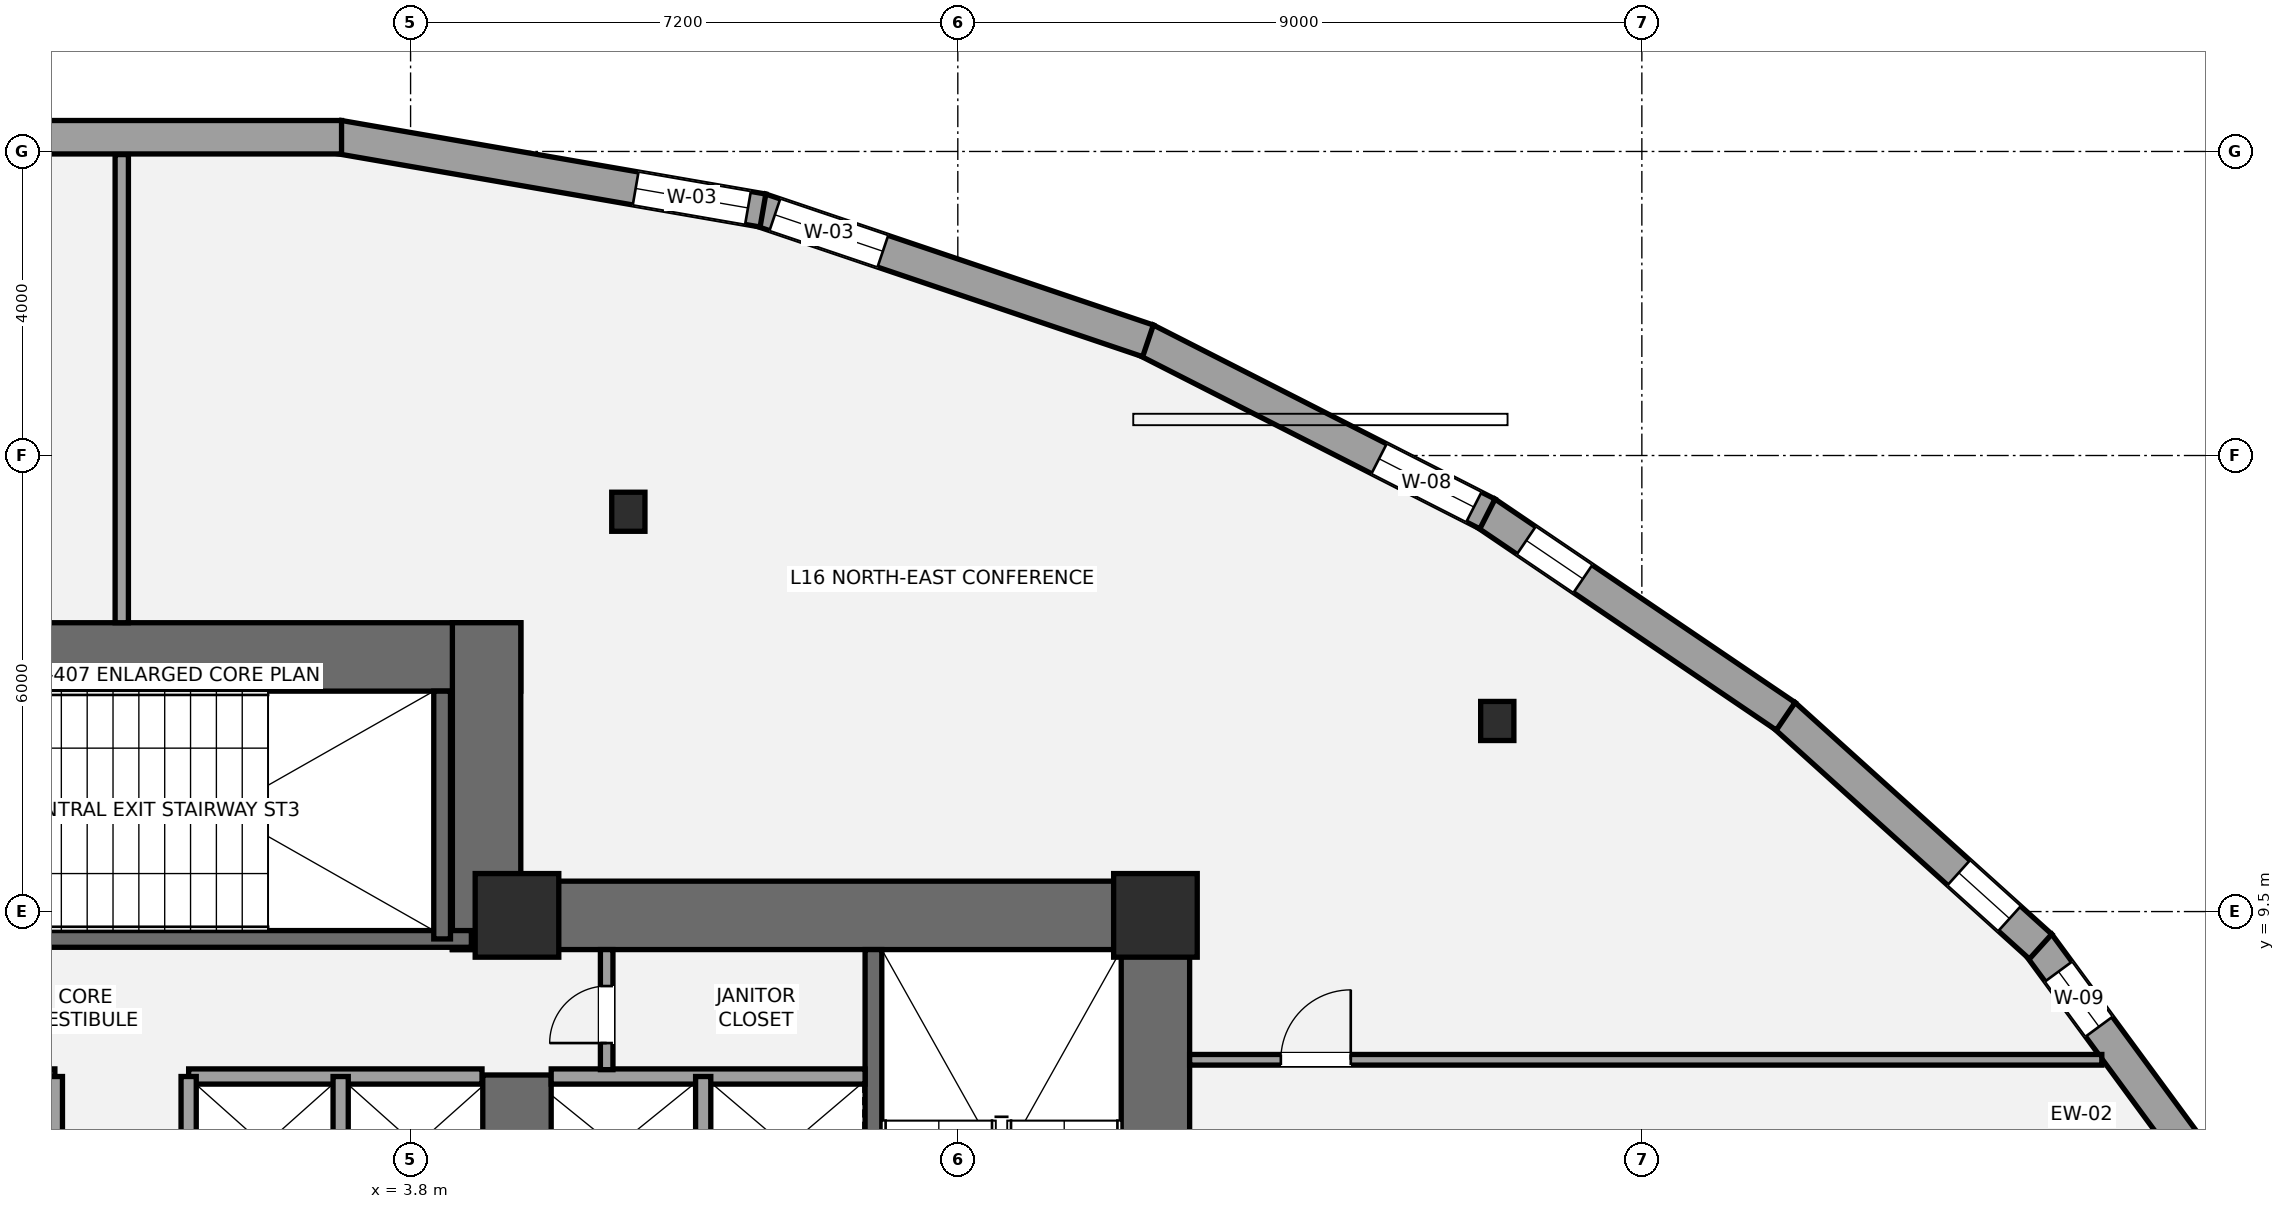
"""IFC4 building model, lengths in metres.
Left out: names, types, materials, properties, quantities, classifications, styles, units other than length and angle.
Written with IfcOpenShell. Run it as: python <this file> out.ifc"""

import sys

from ifc_helpers import new_model, si_unit, direction, frame, frame_2d, origin, origin_2d, place, context, subcontext, project, spatial, rectangle, i_section, extrude, element, fill, save


model = new_model("IFC4")
c1 = context("Model", 3, precision=1e-05, world=origin(), true_north=direction((0.0, 1.0)))
c2 = subcontext(c1, "Body", "Model", "MODEL_VIEW")
j1 = project(units=[si_unit("LENGTHUNIT", "METRE"), si_unit("PLANEANGLEUNIT", "RADIAN")], contexts=[c1])
p1 = place(None, origin())
s1 = spatial("IfcSite", under=j1, at=p1, CompositionType="ELEMENT")
p2 = place(p1, origin())
s2 = spatial("IfcBuilding", under=s1, at=p2, CompositionType="ELEMENT")
p3 = place(p2, frame((0.0, 0.0, 63.0)))
s3 = spatial("IfcBuildingStorey", under=s2, at=p3, CompositionType="ELEMENT", Elevation=63.0)
p4 = place(p3, frame((13.6, 0.95, 0.0), z_axis=(0.0, 0.0, 1.0), x_axis=(0.0, 1.0, 0.0)))
e1 = element("IfcWall", 1, at=p4, inside=s3, PredefinedType="SHEAR", context=c2, shape_type="SweptSolid", body=[
    extrude(rectangle(XDim=8.95, YDim=0.9, at=frame_2d((4.475, 0.0))), origin(), (0.0, 0.0, 1.0), 3.6),
])
p5 = place(p3, frame((4.35, 9.45, 0.0), z_axis=(0.0, 0.0, 1.0), x_axis=(1.0, 0.0, 0.0)))
e2 = element("IfcWall", 2, at=p5, inside=s3, PredefinedType="SHEAR", context=c2, shape_type="SweptSolid", body=[
    extrude(rectangle(XDim=9.7, YDim=0.9, at=frame_2d((4.85, 0.0))), origin(), (0.0, 0.0, 1.0), 3.6),
])
p6 = place(p3, frame((5.2, 5.35, 0.0), z_axis=(0.0, 0.0, 1.0), x_axis=(0.0, 1.0, 0.0)))
e3 = element("IfcWall", 3, at=p6, inside=s3, PredefinedType="SHEAR", context=c2, shape_type="SweptSolid", body=[
    extrude(rectangle(XDim=2.0, YDim=0.9, at=frame_2d((1.0, 0.0))), origin(), (0.0, 0.0, 1.0), 3.6),
])
p7 = place(p3, frame((9.89, 1.85, 0.0), z_axis=(0.0, 0.0, 1.0), x_axis=(0.0, 1.0, 0.0)))
e4 = element("IfcWall", 4, at=p7, inside=s3, PredefinedType="SHEAR", context=c2, shape_type="SweptSolid", body=[
    extrude(rectangle(XDim=7.15, YDim=0.22, at=frame_2d((3.575, 0.0))), origin(), (0.0, 0.0, 1.0), 3.6),
])
p8 = place(p3, frame((-5.25, 12.85, 0.0), z_axis=(0.0, 0.0, 1.0), x_axis=(1.0, 0.0, 0.0)))
e5 = element("IfcWall", 5, at=p8, inside=s3, PredefinedType="SHEAR", context=c2, shape_type="SweptSolid", body=[
    extrude(rectangle(XDim=10.5, YDim=0.9, at=frame_2d((5.25, 0.0))), origin(), (0.0, 0.0, 1.0), 3.6),
])
p9 = place(p3, frame((4.8, 9.0, 0.0), z_axis=(0.0, 0.0, 1.0), x_axis=(0.0, 1.0, 0.0)))
e6 = element("IfcWall", 6, at=p9, inside=s3, PredefinedType="SHEAR", context=c2, shape_type="SweptSolid", body=[
    extrude(rectangle(XDim=4.3, YDim=0.9, at=frame_2d((2.15, 0.0))), origin(), (0.0, 0.0, 1.0), 3.6),
])
p10 = place(p3, frame((-4.7, 9.14, 0.0), z_axis=(0.0, 0.0, 1.0), x_axis=(1.0, 0.0, 0.0)))
e7 = element("IfcWall", 7, at=p10, inside=s3, PredefinedType="SHEAR", context=c2, shape_type="SweptSolid", body=[
    extrude(rectangle(XDim=9.3, YDim=0.22, at=frame_2d((4.65, 0.0))), origin(), (0.0, 0.0, 1.0), 3.6),
])
p11 = place(p10, frame((1.15, 0.0, 0.0)))
e8 = element("IfcOpeningElement", 8, at=p11, cuts=e7, PredefinedType="OPENING", context=c2, shape_type="SweptSolid", body=[
    extrude(rectangle(XDim=1.05, YDim=2.15, at=frame_2d((0.525, 1.075))), frame((0.0, 0.12, 0.0), z_axis=(0.0, -1.0, 0.0), x_axis=(1.0, 0.0, 0.0)), (0.0, 0.0, 1.0), 0.24),
])
p12 = place(p3, frame((4.215, 9.14, 0.0), z_axis=(0.0, 0.0, 1.0), x_axis=(0.0, 1.0, 0.0)))
e9 = element("IfcWall", 9, at=p12, inside=s3, PredefinedType="SHEAR", context=c2, shape_type="SweptSolid", body=[
    extrude(rectangle(XDim=3.26, YDim=0.22, at=frame_2d((1.63, 0.0))), origin(), (0.0, 0.0, 1.0), 3.6),
])
for number, where, z_axis, x_axis in (
    (10, (5.2, 9.45, 0.0), (0.0, 0.0, 1.0), (1.0, 0.0, 0.0)),
    (11, (13.6, 9.45, 0.0), (0.0, 0.0, 1.0), (1.0, 0.0, 0.0)),
):
    element("IfcColumn", number, at=place(p3, frame(where, z_axis=z_axis, x_axis=x_axis)), inside=s3, PredefinedType="COLUMN", context=c2, shape_type="SweptSolid", body=[
        extrude(rectangle(XDim=1.1, YDim=1.1, at=origin_2d()), origin(), (0.0, 0.0, 1.0), 3.6),
    ])
for number, where, z_axis, x_axis in (
    (12, (18.098, 12.007, 0.0), (0.0, 0.0, 1.0), (1.0, 0.0, 0.0)),
    (13, (6.665, 14.76, 0.0), (0.0, 0.0, 1.0), (1.0, 0.0, 0.0)),
):
    element("IfcColumn", number, at=place(p3, frame(where, z_axis=z_axis, x_axis=x_axis)), inside=s3, PredefinedType="COLUMN", context=c2, shape_type="SweptSolid", body=[
        extrude(i_section(OverallWidth=0.437, OverallDepth=0.514, WebThickness=0.061, FlangeThickness=0.097, at=origin_2d()), origin(), (0.0, 0.0, 1.0), 3.6),
    ])
p13 = place(p3, frame((25.216, 9.072, 0.0), z_axis=(0.0, 0.0, 1.0), x_axis=(0.592261182237, -0.80574604685, 0.0)))
e14 = element("IfcWall", 14, at=p13, inside=s3, PredefinedType="STANDARD", context=c2, shape_type="SweptSolid", body=[
    extrude(rectangle(XDim=4.291, YDim=0.44, at=frame_2d((2.146, 0.0))), origin(), (0.0, 0.0, 1.0), 2.529),
])
p14 = place(p13, frame((0.449, 0.0, 0.58)))
e15 = element("IfcOpeningElement", 15, at=p14, cuts=e14, PredefinedType="OPENING", context=c2, shape_type="SweptSolid", body=[
    extrude(rectangle(XDim=0.9, YDim=1.35, at=frame_2d((0.45, 0.675))), frame((0.0, 0.23, 0.0), z_axis=(0.0, -1.0, 0.0), x_axis=(1.0, 0.0, 0.0)), (0.0, 0.0, 1.0), 0.46),
])
p15 = place(p3, frame((21.869, 12.087, 0.0), z_axis=(0.0, 0.0, 1.0), x_axis=(0.742354052059, -0.670007806963, 0.0)))
e16 = element("IfcWall", 16, at=p15, inside=s3, PredefinedType="STANDARD", context=c2, shape_type="SweptSolid", body=[
    extrude(rectangle(XDim=4.549, YDim=0.44, at=frame_2d((2.274, 0.0))), origin(), (0.0, 0.0, 1.0), 2.529),
])
p16 = place(p15, frame((3.099, 0.0, 0.58)))
e17 = element("IfcOpeningElement", 17, at=p16, cuts=e16, PredefinedType="OPENING", context=c2, shape_type="SweptSolid", body=[
    extrude(rectangle(XDim=0.9, YDim=1.35, at=frame_2d((0.45, 0.675))), frame((0.0, 0.23, 0.0), z_axis=(0.0, -1.0, 0.0), x_axis=(1.0, 0.0, 0.0)), (0.0, 0.0, 1.0), 0.46),
])
p17 = place(p3, frame((17.945, 14.745, 0.0), z_axis=(0.0, 0.0, 1.0), x_axis=(0.827693991977, -0.561179699959, 0.0)))
e18 = element("IfcWall", 18, at=p17, inside=s3, PredefinedType="STANDARD", context=c2, shape_type="SweptSolid", body=[
    extrude(rectangle(XDim=4.77, YDim=0.44, at=frame_2d((2.385, 0.0))), origin(), (0.0, 0.0, 1.0), 2.529),
])
p18 = place(p17, frame((0.646, 0.0, 0.58)))
e19 = element("IfcOpeningElement", 19, at=p18, cuts=e18, PredefinedType="OPENING", context=c2, shape_type="SweptSolid", body=[
    extrude(rectangle(XDim=0.9, YDim=1.35, at=frame_2d((0.45, 0.675))), frame((0.0, 0.23, 0.0), z_axis=(0.0, -1.0, 0.0), x_axis=(1.0, 0.0, 0.0)), (0.0, 0.0, 1.0), 0.46),
])
p19 = place(p3, frame((13.473, 17.021, 0.0), z_axis=(0.0, 0.0, 1.0), x_axis=(0.891072734441, -0.45386053137, 0.0)))
e20 = element("IfcWall", 20, at=p19, inside=s3, PredefinedType="STANDARD", context=c2, shape_type="SweptSolid", body=[
    extrude(rectangle(XDim=5.045, YDim=0.44, at=frame_2d((2.522, 0.0))), origin(), (0.0, 0.0, 1.0), 2.529),
])
p20 = place(p19, frame((3.445, 0.0, 0.58)))
e21 = element("IfcOpeningElement", 21, at=p20, cuts=e20, PredefinedType="OPENING", context=c2, shape_type="SweptSolid", body=[
    extrude(rectangle(XDim=1.4, YDim=1.55, at=frame_2d((0.7, 0.775))), frame((0.0, 0.23, 0.0), z_axis=(0.0, -1.0, 0.0), x_axis=(1.0, 0.0, 0.0)), (0.0, 0.0, 1.0), 0.46),
])
p21 = place(p3, frame((8.403, 18.731, 0.0), z_axis=(0.0, 0.0, 1.0), x_axis=(0.947368862969, -0.320144088616, 0.0)))
e22 = element("IfcWall", 22, at=p21, inside=s3, PredefinedType="STANDARD", context=c2, shape_type="SweptSolid", body=[
    extrude(rectangle(XDim=5.382, YDim=0.44, at=frame_2d((2.691, 0.0))), origin(), (0.0, 0.0, 1.0), 2.529),
])
p22 = place(p21, frame((0.2, 0.0, 0.48)))
e23 = element("IfcOpeningElement", 23, at=p22, cuts=e22, PredefinedType="OPENING", context=c2, shape_type="SweptSolid", body=[
    extrude(rectangle(XDim=1.5, YDim=1.7, at=frame_2d((0.75, 0.85))), frame((0.0, 0.23, 0.0), z_axis=(0.0, -1.0, 0.0), x_axis=(1.0, 0.0, 0.0)), (0.0, 0.0, 1.0), 0.46),
])
p23 = place(p3, frame((2.854, 19.69, 0.0), z_axis=(0.0, 0.0, 1.0), x_axis=(0.985308697227, -0.170782818716, 0.0)))
e24 = element("IfcWall", 24, at=p23, inside=s3, PredefinedType="STANDARD", context=c2, shape_type="SweptSolid", body=[
    extrude(rectangle(XDim=5.665, YDim=0.44, at=frame_2d((2.833, 0.0))), origin(), (0.0, 0.0, 1.0), 2.529),
])
p24 = place(p23, frame((3.965, 0.0, 0.65)))
e25 = element("IfcOpeningElement", 25, at=p24, cuts=e24, PredefinedType="OPENING", context=c2, shape_type="SweptSolid", body=[
    extrude(rectangle(XDim=1.5, YDim=1.7, at=frame_2d((0.75, 0.85))), frame((0.0, 0.23, 0.0), z_axis=(0.0, -1.0, 0.0), x_axis=(1.0, 0.0, 0.0)), (0.0, 0.0, 1.0), 0.46),
])
p25 = place(p3, frame((-2.892, 19.687, 0.0), z_axis=(0.0, 0.0, 1.0), x_axis=(1.0, 0.0, 0.0)))
e26 = element("IfcWall", 26, at=p25, inside=s3, PredefinedType="STANDARD", context=c2, shape_type="SweptSolid", body=[
    extrude(rectangle(XDim=5.784, YDim=0.44, at=frame_2d((2.892, 0.0))), origin(), (0.0, 0.0, 1.0), 2.529),
])
p26 = place(p25, frame((0.25, 0.0, 0.65)))
e27 = element("IfcOpeningElement", 27, at=p26, cuts=e26, PredefinedType="OPENING", context=c2, shape_type="SweptSolid", body=[
    extrude(rectangle(XDim=1.5, YDim=1.7, at=frame_2d((0.75, 0.85))), frame((0.0, 0.23, 0.0), z_axis=(0.0, -1.0, 0.0), x_axis=(1.0, 0.0, 0.0)), (0.0, 0.0, 1.0), 0.46),
])
p27 = place(p3, frame((5.65, 7.33, 0.0), z_axis=(0.0, 0.0, 1.0), x_axis=(1.0, 0.0, 0.0)))
e28 = element("IfcWall", 28, at=p27, inside=s3, PredefinedType="SOLIDWALL", context=c2, shape_type="SweptSolid", body=[
    extrude(rectangle(XDim=4.13, YDim=0.2, at=frame_2d((2.065, 0.0))), origin(), (0.0, 0.0, 1.0), 3.4),
])
p28 = place(p3, frame((7.65, 5.47, 0.0), z_axis=(0.0, 0.0, 1.0), x_axis=(0.0, 1.0, 0.0)))
e29 = element("IfcWall", 29, at=p28, inside=s3, PredefinedType="SOLIDWALL", context=c2, shape_type="SweptSolid", body=[
    extrude(rectangle(XDim=1.86, YDim=0.2, at=frame_2d((0.93, 0.0))), origin(), (0.0, 0.0, 1.0), 3.4),
])
for number, where, z_axis, x_axis in (
    (30, (-4.74, 7.33, 0.0), (0.0, 0.0, 1.0), (1.0, 0.0, 0.0)),
    (31, (0.88, 7.33, 0.0), (0.0, 0.0, 1.0), (1.0, 0.0, 0.0)),
):
    element("IfcWall", number, at=place(p3, frame(where, z_axis=z_axis, x_axis=x_axis)), inside=s3, PredefinedType="SOLIDWALL", context=c2, shape_type="SweptSolid", body=[
        extrude(rectangle(XDim=3.86, YDim=0.2, at=frame_2d((1.93, 0.0))), origin(), (0.0, 0.0, 1.0), 3.4),
    ])
for number, where, z_axis, x_axis in (
    (32, (2.88, 5.52, 0.0), (0.0, 0.0, 1.0), (0.0, 1.0, 0.0)),
    (33, (-0.88, 5.52, 0.0), (0.0, 0.0, 1.0), (0.0, 1.0, 0.0)),
    (34, (0.88, 5.52, 0.0), (0.0, 0.0, 1.0), (0.0, 1.0, 0.0)),
):
    element("IfcWall", number, at=place(p3, frame(where, z_axis=z_axis, x_axis=x_axis)), inside=s3, PredefinedType="SOLIDWALL", context=c2, shape_type="SweptSolid", body=[
        extrude(rectangle(XDim=1.81, YDim=0.2, at=frame_2d((0.905, 0.0))), origin(), (0.0, 0.0, 1.0), 3.4),
    ])
p29 = place(p3, frame((6.38, 7.42, 0.0), z_axis=(0.0, 0.0, 1.0), x_axis=(0.0, 1.0, 0.0)))
e35 = element("IfcWall", 35, at=p29, inside=s3, PredefinedType="PARTITIONING", context=c2, shape_type="SweptSolid", body=[
    extrude(rectangle(XDim=1.58, YDim=0.165, at=frame_2d((0.79, 0.0))), origin(), (0.0, 0.0, 1.0), 3.4),
])
p30 = place(p29, frame((0.35, 0.0, 0.0)))
e36 = element("IfcOpeningElement", 36, at=p30, cuts=e35, PredefinedType="OPENING", context=c2, shape_type="SweptSolid", body=[
    extrude(rectangle(XDim=0.75, YDim=2.1, at=frame_2d((0.375, 1.05))), frame((0.0, 0.093, 0.0), z_axis=(0.0, -1.0, 0.0), x_axis=(1.0, 0.0, 0.0)), (0.0, 0.0, 1.0), 0.185),
])
p31 = place(p3, frame((14.05, 7.55, 0.0), z_axis=(0.0, 0.0, 1.0), x_axis=(1.0, 0.0, 0.0)))
e37 = element("IfcWall", 37, at=p31, inside=s3, PredefinedType="PARTITIONING", context=c2, shape_type="SweptSolid", body=[
    extrude(rectangle(XDim=12.002, YDim=0.14, at=frame_2d((6.001, 0.0))), origin(), (0.0, 0.0, 1.0), 3.4),
])
p32 = place(p31, frame((1.2, 0.0, 0.0)))
e38 = element("IfcOpeningElement", 38, at=p32, cuts=e37, PredefinedType="OPENING", context=c2, shape_type="SweptSolid", body=[
    extrude(rectangle(XDim=0.92, YDim=2.15, at=frame_2d((0.46, 1.075))), frame((0.0, 0.08, 0.0), z_axis=(0.0, -1.0, 0.0), x_axis=(1.0, 0.0, 0.0)), (0.0, 0.0, 1.0), 0.16),
])
p33 = place(p3, frame((0.0, 13.3, 0.0), z_axis=(0.0, 0.0, 1.0), x_axis=(0.0, 1.0, 0.0)))
e39 = element("IfcWall", 39, at=p33, inside=s3, PredefinedType="PARTITIONING", context=c2, shape_type="SweptSolid", body=[
    extrude(rectangle(XDim=6.159, YDim=0.175, at=frame_2d((3.08, 0.0))), origin(), (0.0, 0.0, 1.0), 3.4),
])
p34 = place(p14, origin())
e40 = element("IfcWindow", 40, at=p34, inside=s3, PartitioningType="SINGLE_PANEL", PredefinedType="WINDOW", context=c2, shape_type="SweptSolid", body=[
    extrude(rectangle(XDim=0.9, YDim=1.35, at=frame_2d((0.45, 0.675))), frame((0.0, -0.01, 0.0), z_axis=(0.0, -1.0, 0.0), x_axis=(1.0, 0.0, 0.0)), (0.0, 0.0, 1.0), 0.06),
])
fill(e15, e40)
p35 = place(p16, origin())
e41 = element("IfcWindow", 41, at=p35, inside=s3, PartitioningType="SINGLE_PANEL", PredefinedType="WINDOW", context=c2, shape_type="SweptSolid", body=[
    extrude(rectangle(XDim=0.9, YDim=1.35, at=frame_2d((0.45, 0.675))), frame((0.0, -0.01, 0.0), z_axis=(0.0, -1.0, 0.0), x_axis=(1.0, 0.0, 0.0)), (0.0, 0.0, 1.0), 0.06),
])
fill(e17, e41)
p36 = place(p18, origin())
e42 = element("IfcWindow", 42, at=p36, inside=s3, PartitioningType="SINGLE_PANEL", PredefinedType="WINDOW", context=c2, shape_type="SweptSolid", body=[
    extrude(rectangle(XDim=0.9, YDim=1.35, at=frame_2d((0.45, 0.675))), frame((0.0, -0.01, 0.0), z_axis=(0.0, -1.0, 0.0), x_axis=(1.0, 0.0, 0.0)), (0.0, 0.0, 1.0), 0.06),
])
fill(e19, e42)
p37 = place(p20, origin())
e43 = element("IfcWindow", 43, at=p37, inside=s3, PartitioningType="SINGLE_PANEL", PredefinedType="WINDOW", context=c2, shape_type="SweptSolid", body=[
    extrude(rectangle(XDim=1.4, YDim=1.55, at=frame_2d((0.7, 0.775))), frame((0.0, -0.01, 0.0), z_axis=(0.0, -1.0, 0.0), x_axis=(1.0, 0.0, 0.0)), (0.0, 0.0, 1.0), 0.06),
])
fill(e21, e43)
p38 = place(p22, origin())
e44 = element("IfcWindow", 44, at=p38, inside=s3, PartitioningType="SINGLE_PANEL", PredefinedType="WINDOW", context=c2, shape_type="SweptSolid", body=[
    extrude(rectangle(XDim=1.5, YDim=1.7, at=frame_2d((0.75, 0.85))), frame((0.0, -0.01, 0.0), z_axis=(0.0, -1.0, 0.0), x_axis=(1.0, 0.0, 0.0)), (0.0, 0.0, 1.0), 0.06),
])
fill(e23, e44)
p39 = place(p24, origin())
e45 = element("IfcWindow", 45, at=p39, inside=s3, PartitioningType="SINGLE_PANEL", PredefinedType="WINDOW", context=c2, shape_type="SweptSolid", body=[
    extrude(rectangle(XDim=1.5, YDim=1.7, at=frame_2d((0.75, 0.85))), frame((0.0, -0.01, 0.0), z_axis=(0.0, -1.0, 0.0), x_axis=(1.0, 0.0, 0.0)), (0.0, 0.0, 1.0), 0.06),
])
fill(e25, e45)
p40 = place(p30, origin())
e46 = element("IfcDoor", 46, at=p40, inside=s3, OperationType="SINGLE_SWING_LEFT", PredefinedType="DOOR", context=c2, shape_type="SweptSolid", body=[
    extrude(rectangle(XDim=0.75, YDim=2.1, at=frame_2d((0.375, 1.05))), frame((0.0, 0.025, 0.0), z_axis=(0.0, -1.0, 0.0), x_axis=(1.0, 0.0, 0.0)), (0.0, 0.0, 1.0), 0.05),
])
fill(e36, e46)
p41 = place(p32, origin())
e47 = element("IfcDoor", 47, at=p41, inside=s3, OperationType="SINGLE_SWING_RIGHT", PredefinedType="DOOR", context=c2, shape_type="SweptSolid", body=[
    extrude(rectangle(XDim=0.92, YDim=2.15, at=frame_2d((0.46, 1.075))), frame((0.0, 0.025, 0.0), z_axis=(0.0, -1.0, 0.0), x_axis=(1.0, 0.0, 0.0)), (0.0, 0.0, 1.0), 0.05),
])
fill(e38, e47)
save(model, sys.argv[1])
